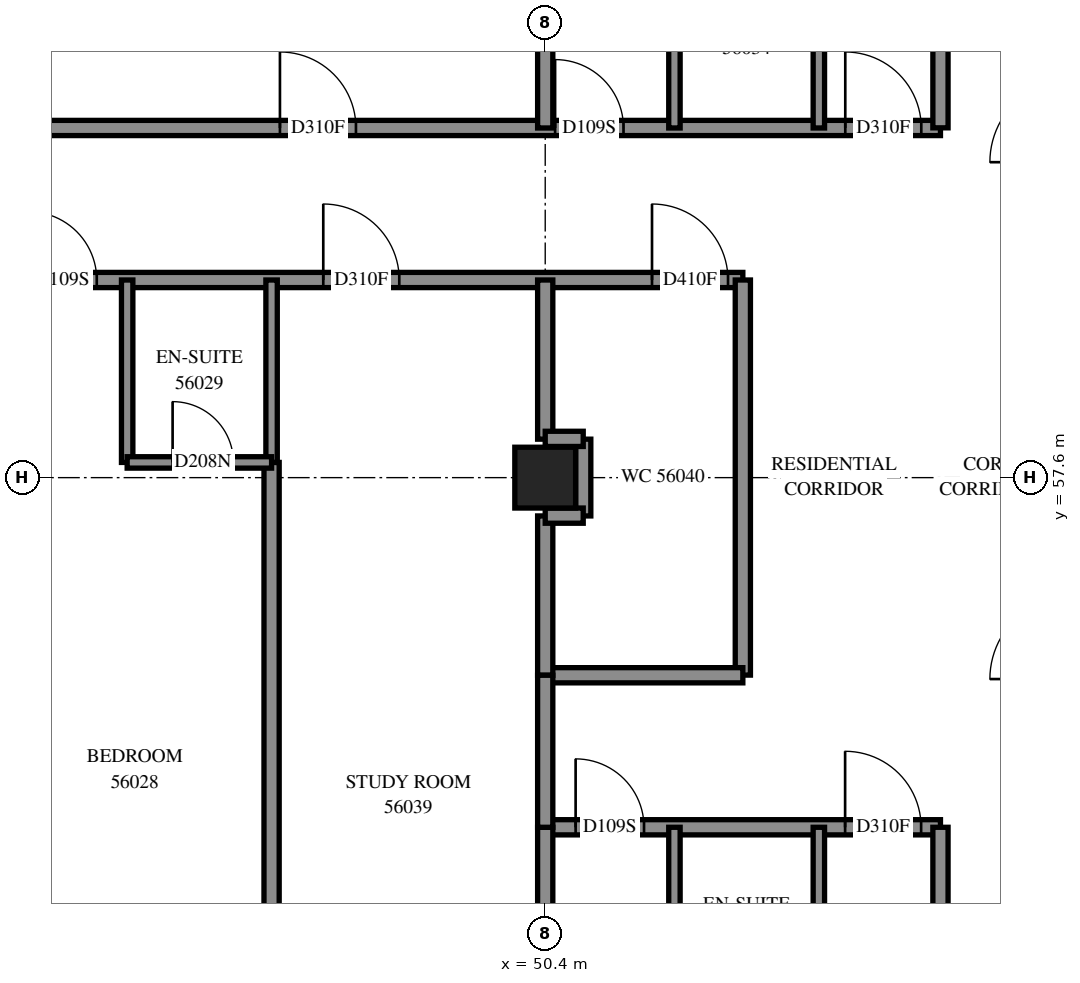
"""IFC4 building model, lengths in metres.
Left out: names, types, materials, properties, quantities, classifications, styles, units other than length and angle.
Written with IfcOpenShell. Run it as: python <this file> out.ifc"""

import sys

from ifc_helpers import new_model, si_unit, direction, frame, frame_2d, origin, origin_2d, place, context, subcontext, project, spatial, rectangle, extrude, element, fill, save


model = new_model("IFC4")
c1 = context("Model", 3, precision=1e-05, world=origin(), true_north=direction((0.0, 1.0)))
c2 = subcontext(c1, "Body", "Model", "MODEL_VIEW")
j1 = project(units=[si_unit("LENGTHUNIT", "METRE"), si_unit("PLANEANGLEUNIT", "RADIAN")], contexts=[c1])
p1 = place(None, origin())
s1 = spatial("IfcSite", under=j1, at=p1, CompositionType="ELEMENT")
p2 = place(p1, origin())
s2 = spatial("IfcBuilding", under=s1, at=p2, CompositionType="ELEMENT")
p3 = place(p2, frame((0.0, 0.0, 206.6)))
s3 = spatial("IfcBuildingStorey", under=s2, at=p3, CompositionType="ELEMENT", Elevation=206.6)
p4 = place(p3, frame((50.4, 57.6, 0.0), z_axis=(0.0, 0.0, 1.0), x_axis=(1.0, 0.0, 0.0)))
e1 = element("IfcColumn", 1, at=p4, inside=s3, PredefinedType="COLUMN", context=c2, shape_type="SweptSolid", body=[
    extrude(rectangle(XDim=0.8, YDim=0.8, at=origin_2d()), origin(), (0.0, 0.0, 1.0), 3.1),
])
p5 = place(p3, frame((36.0, 60.2, 0.0), z_axis=(0.0, 0.0, 1.0), x_axis=(1.0, 0.0, 0.0)))
e2 = element("IfcWall", 2, at=p5, inside=s3, PredefinedType="PARTITIONING", context=c2, shape_type="SweptSolid", body=[
    extrude(rectangle(XDim=17.0, YDim=0.2, at=frame_2d((8.5, 0.0))), origin(), (0.0, 0.0, 1.0), 3.1),
])
p6 = place(p5, frame((4.125, 0.0, 0.0)))
e3 = element("IfcOpeningElement", 3, at=p6, cuts=e2, PredefinedType="OPENING", context=c2, shape_type="SweptSolid", body=[
    extrude(rectangle(XDim=1.0, YDim=2.1, at=frame_2d((0.5, 1.05))), frame((0.0, 0.11, 0.0), z_axis=(0.0, -1.0, 0.0), x_axis=(1.0, 0.0, 0.0)), (0.0, 0.0, 1.0), 0.22),
])
p7 = place(p5, frame((7.6, 0.0, 0.0)))
e4 = element("IfcOpeningElement", 4, at=p7, cuts=e2, PredefinedType="OPENING", context=c2, shape_type="SweptSolid", body=[
    extrude(rectangle(XDim=0.9, YDim=2.1, at=frame_2d((0.45, 1.05))), frame((0.0, 0.11, 0.0), z_axis=(0.0, -1.0, 0.0), x_axis=(1.0, 0.0, 0.0)), (0.0, 0.0, 1.0), 0.22),
])
p8 = place(p5, frame((11.48, 0.0, 0.0)))
e5 = element("IfcOpeningElement", 5, at=p8, cuts=e2, PredefinedType="OPENING", context=c2, shape_type="SweptSolid", body=[
    extrude(rectangle(XDim=1.0, YDim=2.1, at=frame_2d((0.5, 1.05))), frame((0.0, 0.11, 0.0), z_axis=(0.0, -1.0, 0.0), x_axis=(1.0, 0.0, 0.0)), (0.0, 0.0, 1.0), 0.22),
])
p9 = place(p5, frame((15.805, 0.0, 0.0)))
e6 = element("IfcOpeningElement", 6, at=p9, cuts=e2, PredefinedType="OPENING", context=c2, shape_type="SweptSolid", body=[
    extrude(rectangle(XDim=1.0, YDim=2.1, at=frame_2d((0.5, 1.05))), frame((0.0, 0.11, 0.0), z_axis=(0.0, -1.0, 0.0), x_axis=(1.0, 0.0, 0.0)), (0.0, 0.0, 1.0), 0.22),
])
p10 = place(p3, frame((40.602, 62.2, 0.0), z_axis=(0.0, 0.0, 1.0), x_axis=(1.0, 0.0, 0.0)))
e7 = element("IfcWall", 7, at=p10, inside=s3, PredefinedType="PARTITIONING", context=c2, shape_type="SweptSolid", body=[
    extrude(rectangle(XDim=14.998, YDim=0.2, at=frame_2d((7.499, 0.0))), origin(), (0.0, 0.0, 1.0), 3.1),
])
p11 = place(p10, frame((6.308, 0.0, 0.0)))
e8 = element("IfcOpeningElement", 8, at=p11, cuts=e7, PredefinedType="OPENING", context=c2, shape_type="SweptSolid", body=[
    extrude(rectangle(XDim=1.0, YDim=2.1, at=frame_2d((0.5, 1.05))), frame((0.0, 0.11, 0.0), z_axis=(0.0, -1.0, 0.0), x_axis=(1.0, 0.0, 0.0)), (0.0, 0.0, 1.0), 0.22),
])
p12 = place(p10, frame((9.928, 0.0, 0.0)))
e9 = element("IfcOpeningElement", 9, at=p12, cuts=e7, PredefinedType="OPENING", context=c2, shape_type="SweptSolid", body=[
    extrude(rectangle(XDim=0.9, YDim=2.1, at=frame_2d((0.45, 1.05))), frame((0.0, 0.11, 0.0), z_axis=(0.0, -1.0, 0.0), x_axis=(1.0, 0.0, 0.0)), (0.0, 0.0, 1.0), 0.22),
])
p13 = place(p10, frame((13.746, 0.0, 0.0)))
e10 = element("IfcOpeningElement", 10, at=p13, cuts=e7, PredefinedType="OPENING", context=c2, shape_type="SweptSolid", body=[
    extrude(rectangle(XDim=1.0, YDim=2.1, at=frame_2d((0.5, 1.05))), frame((0.0, 0.11, 0.0), z_axis=(0.0, -1.0, 0.0), x_axis=(1.0, 0.0, 0.0)), (0.0, 0.0, 1.0), 0.22),
])
p14 = place(p3, frame((46.8, 49.7, 0.0), z_axis=(0.0, 0.0, 1.0), x_axis=(0.0, 1.0, 0.0)))
e11 = element("IfcWall", 11, at=p14, inside=s3, PredefinedType="PARTITIONING", context=c2, shape_type="SweptSolid", body=[
    extrude(rectangle(XDim=8.1, YDim=0.2, at=frame_2d((4.05, 0.0))), origin(), (0.0, 0.0, 1.0), 3.1),
])
p15 = place(p3, frame((50.4, 53.0, 0.0), z_axis=(0.0, 0.0, 1.0), x_axis=(1.0, 0.0, 0.0)))
e12 = element("IfcWall", 12, at=p15, inside=s3, PredefinedType="PARTITIONING", context=c2, shape_type="SweptSolid", body=[
    extrude(rectangle(XDim=5.2, YDim=0.2, at=frame_2d((2.6, 0.0))), origin(), (0.0, 0.0, 1.0), 3.1),
])
p16 = place(p15, frame((0.4, 0.0, 0.0)))
e13 = element("IfcOpeningElement", 13, at=p16, cuts=e12, PredefinedType="OPENING", context=c2, shape_type="SweptSolid", body=[
    extrude(rectangle(XDim=0.9, YDim=2.1, at=frame_2d((0.45, 1.05))), frame((0.0, 0.11, 0.0), z_axis=(0.0, -1.0, 0.0), x_axis=(1.0, 0.0, 0.0)), (0.0, 0.0, 1.0), 0.22),
])
p17 = place(p15, frame((3.946, 0.0, 0.0)))
e14 = element("IfcOpeningElement", 14, at=p17, cuts=e12, PredefinedType="OPENING", context=c2, shape_type="SweptSolid", body=[
    extrude(rectangle(XDim=1.0, YDim=2.1, at=frame_2d((0.5, 1.05))), frame((0.0, 0.11, 0.0), z_axis=(0.0, -1.0, 0.0), x_axis=(1.0, 0.0, 0.0)), (0.0, 0.0, 1.0), 0.22),
])
p18 = place(p3, frame((53.0, 55.002, 0.0), z_axis=(0.0, 0.0, 1.0), x_axis=(0.0, 1.0, 0.0)))
e15 = element("IfcWall", 15, at=p18, inside=s3, PredefinedType="PARTITIONING", context=c2, shape_type="SweptSolid", body=[
    extrude(rectangle(XDim=5.198, YDim=0.2, at=frame_2d((2.599, 0.0))), origin(), (0.0, 0.0, 1.0), 3.1),
])
p19 = place(p3, frame((55.6, 48.4, 0.0), z_axis=(0.0, 0.0, 1.0), x_axis=(0.0, 1.0, 0.0)))
e16 = element("IfcWall", 16, at=p19, inside=s3, PredefinedType="PARTITIONING", context=c2, shape_type="SweptSolid", body=[
    extrude(rectangle(XDim=4.6, YDim=0.2, at=frame_2d((2.3, 0.0))), origin(), (0.0, 0.0, 1.0), 3.1),
])
p20 = place(p3, frame((55.6, 62.202, 0.0), z_axis=(0.0, 0.0, 1.0), x_axis=(0.0, 1.0, 0.0)))
e17 = element("IfcWall", 17, at=p20, inside=s3, PredefinedType="PARTITIONING", context=c2, shape_type="SweptSolid", body=[
    extrude(rectangle(XDim=4.598, YDim=0.2, at=frame_2d((2.299, 0.0))), origin(), (0.0, 0.0, 1.0), 3.1),
])
p21 = place(p3, frame((50.4, 55.0, 0.0), z_axis=(0.0, 0.0, 1.0), x_axis=(1.0, 0.0, 0.0)))
e18 = element("IfcWall", 18, at=p21, inside=s3, PredefinedType="PARTITIONING", context=c2, shape_type="SweptSolid", body=[
    extrude(rectangle(XDim=2.6, YDim=0.2, at=frame_2d((1.3, 0.0))), origin(), (0.0, 0.0, 1.0), 3.1),
])
for number, where, z_axis, x_axis in (
    (19, (44.9, 57.8, 0.0), (0.0, 0.0, 1.0), (0.0, 1.0, 0.0)),
    (20, (46.8, 57.8, 0.0), (0.0, 0.0, 1.0), (0.0, 1.0, 0.0)),
    (21, (52.1, 50.6, 0.0), (0.0, 0.0, 1.0), (0.0, 1.0, 0.0)),
    (22, (54.0, 50.6, 0.0), (0.0, 0.0, 1.0), (0.0, 1.0, 0.0)),
    (23, (52.1, 62.2, 0.0), (0.0, 0.0, 1.0), (0.0, 1.0, 0.0)),
    (24, (54.0, 62.2, 0.0), (0.0, 0.0, 1.0), (0.0, 1.0, 0.0)),
):
    element("IfcWall", number, at=place(p3, frame(where, z_axis=z_axis, x_axis=x_axis)), inside=s3, PredefinedType="PARTITIONING", context=c2, shape_type="SweptSolid", body=[
        extrude(rectangle(XDim=2.4, YDim=0.15, at=frame_2d((1.2, 0.0))), origin(), (0.0, 0.0, 1.0), 3.1),
    ])
p22 = place(p3, frame((50.4, 50.8, 0.0), z_axis=(0.0, 0.0, 1.0), x_axis=(0.0, 1.0, 0.0)))
e25 = element("IfcWall", 25, at=p22, inside=s3, PredefinedType="PARTITIONING", context=c2, shape_type="SweptSolid", body=[
    extrude(rectangle(XDim=2.2, YDim=0.2, at=frame_2d((1.1, 0.0))), origin(), (0.0, 0.0, 1.0), 3.1),
])
for number, where, z_axis, x_axis in (
    (26, (50.4, 62.2, 0.0), (0.0, 0.0, 1.0), (0.0, 1.0, 0.0)),
    (27, (50.4, 55.0, 0.0), (0.0, 0.0, 1.0), (0.0, 1.0, 0.0)),
):
    element("IfcWall", number, at=place(p3, frame(where, z_axis=z_axis, x_axis=x_axis)), inside=s3, PredefinedType="PARTITIONING", context=c2, shape_type="SweptSolid", body=[
        extrude(rectangle(XDim=2.096, YDim=0.2, at=frame_2d((1.048, 0.0))), origin(), (0.0, 0.0, 1.0), 3.1),
    ])
p23 = place(p3, frame((50.4, 58.106, 0.0), z_axis=(0.0, 0.0, 1.0), x_axis=(0.0, 1.0, 0.0)))
e28 = element("IfcWall", 28, at=p23, inside=s3, PredefinedType="PARTITIONING", context=c2, shape_type="SweptSolid", body=[
    extrude(rectangle(XDim=2.094, YDim=0.2, at=frame_2d((1.047, 0.0))), origin(), (0.0, 0.0, 1.0), 3.1),
])
p24 = place(p3, frame((50.4, 53.0, 0.0), z_axis=(0.0, 0.0, 1.0), x_axis=(0.0, 1.0, 0.0)))
e29 = element("IfcWall", 29, at=p24, inside=s3, PredefinedType="PARTITIONING", context=c2, shape_type="SweptSolid", body=[
    extrude(rectangle(XDim=2.0, YDim=0.2, at=frame_2d((1.0, 0.0))), origin(), (0.0, 0.0, 1.0), 3.1),
])
p25 = place(p3, frame((44.9, 57.8, 0.0), z_axis=(0.0, 0.0, 1.0), x_axis=(1.0, 0.0, 0.0)))
e30 = element("IfcWall", 30, at=p25, inside=s3, PredefinedType="PARTITIONING", context=c2, shape_type="SweptSolid", body=[
    extrude(rectangle(XDim=1.9, YDim=0.15, at=frame_2d((0.95, 0.0))), origin(), (0.0, 0.0, 1.0), 3.1),
])
p26 = place(p25, frame((0.598, 0.0, 0.0)))
e31 = element("IfcOpeningElement", 31, at=p26, cuts=e30, PredefinedType="OPENING", context=c2, shape_type="SweptSolid", body=[
    extrude(rectangle(XDim=0.8, YDim=2.1, at=frame_2d((0.4, 1.05))), frame((0.0, 0.085, 0.0), z_axis=(0.0, -1.0, 0.0), x_axis=(1.0, 0.0, 0.0)), (0.0, 0.0, 1.0), 0.17),
])
p27 = place(p3, frame((50.9, 57.096, 0.0), z_axis=(0.0, 0.0, 1.0), x_axis=(0.0, 1.0, 0.0)))
e32 = element("IfcWall", 32, at=p27, inside=s3, PredefinedType="PARTITIONING", context=c2, shape_type="SweptSolid", body=[
    extrude(rectangle(XDim=1.01, YDim=0.2, at=frame_2d((0.505, 0.0))), origin(), (0.0, 0.0, 1.0), 3.1),
])
for number, where, z_axis, x_axis in (
    (33, (50.4, 58.11, 0.0), (0.0, 0.0, 1.0), (1.0, 0.0, 0.0)),
    (34, (50.4, 57.1, 0.0), (0.0, 0.0, 1.0), (1.0, 0.0, 0.0)),
):
    element("IfcWall", number, at=place(p3, frame(where, z_axis=z_axis, x_axis=x_axis)), inside=s3, PredefinedType="PARTITIONING", context=c2, shape_type="SweptSolid", body=[
        extrude(rectangle(XDim=0.5, YDim=0.2, at=frame_2d((0.25, 0.0))), origin(), (0.0, 0.0, 1.0), 3.1),
    ])
p28 = place(p7, origin())
e35 = element("IfcDoor", 35, at=p28, inside=s3, OperationType="SINGLE_SWING_LEFT", PredefinedType="DOOR", context=c2, shape_type="SweptSolid", body=[
    extrude(rectangle(XDim=0.9, YDim=2.1, at=frame_2d((0.45, 1.05))), frame((0.0, 0.025, 0.0), z_axis=(0.0, -1.0, 0.0), x_axis=(1.0, 0.0, 0.0)), (0.0, 0.0, 1.0), 0.05),
])
fill(e4, e35)
p29 = place(p26, origin())
e36 = element("IfcDoor", 36, at=p29, inside=s3, OperationType="SINGLE_SWING_RIGHT", PredefinedType="DOOR", context=c2, shape_type="SweptSolid", body=[
    extrude(rectangle(XDim=0.8, YDim=2.1, at=frame_2d((0.4, 1.05))), frame((0.0, 0.025, 0.0), z_axis=(0.0, -1.0, 0.0), x_axis=(1.0, 0.0, 0.0)), (0.0, 0.0, 1.0), 0.05),
])
fill(e31, e36)
p30 = place(p11, origin())
e37 = element("IfcDoor", 37, at=p30, inside=s3, OperationType="SINGLE_SWING_RIGHT", PredefinedType="DOOR", context=c2, shape_type="SweptSolid", body=[
    extrude(rectangle(XDim=1.0, YDim=2.1, at=frame_2d((0.5, 1.05))), frame((0.0, 0.025, 0.0), z_axis=(0.0, -1.0, 0.0), x_axis=(1.0, 0.0, 0.0)), (0.0, 0.0, 1.0), 0.05),
])
fill(e8, e37)
p31 = place(p12, origin())
e38 = element("IfcDoor", 38, at=p31, inside=s3, OperationType="SINGLE_SWING_RIGHT", PredefinedType="DOOR", context=c2, shape_type="SweptSolid", body=[
    extrude(rectangle(XDim=0.9, YDim=2.1, at=frame_2d((0.45, 1.05))), frame((0.0, 0.025, 0.0), z_axis=(0.0, -1.0, 0.0), x_axis=(1.0, 0.0, 0.0)), (0.0, 0.0, 1.0), 0.05),
])
fill(e9, e38)
p32 = place(p13, origin())
e39 = element("IfcDoor", 39, at=p32, inside=s3, OperationType="SINGLE_SWING_LEFT", PredefinedType="DOOR", context=c2, shape_type="SweptSolid", body=[
    extrude(rectangle(XDim=1.0, YDim=2.1, at=frame_2d((0.5, 1.05))), frame((0.0, 0.025, 0.0), z_axis=(0.0, -1.0, 0.0), x_axis=(1.0, 0.0, 0.0)), (0.0, 0.0, 1.0), 0.05),
])
fill(e10, e39)
p33 = place(p8, origin())
e40 = element("IfcDoor", 40, at=p33, inside=s3, OperationType="SINGLE_SWING_RIGHT", PredefinedType="DOOR", context=c2, shape_type="SweptSolid", body=[
    extrude(rectangle(XDim=1.0, YDim=2.1, at=frame_2d((0.5, 1.05))), frame((0.0, 0.025, 0.0), z_axis=(0.0, -1.0, 0.0), x_axis=(1.0, 0.0, 0.0)), (0.0, 0.0, 1.0), 0.05),
])
fill(e5, e40)
p34 = place(p9, origin())
e41 = element("IfcDoor", 41, at=p34, inside=s3, OperationType="SINGLE_SWING_LEFT", PredefinedType="DOOR", context=c2, shape_type="SweptSolid", body=[
    extrude(rectangle(XDim=1.0, YDim=2.1, at=frame_2d((0.5, 1.05))), frame((0.0, 0.025, 0.0), z_axis=(0.0, -1.0, 0.0), x_axis=(1.0, 0.0, 0.0)), (0.0, 0.0, 1.0), 0.05),
])
fill(e6, e41)
p35 = place(p16, origin())
e42 = element("IfcDoor", 42, at=p35, inside=s3, OperationType="SINGLE_SWING_LEFT", PredefinedType="DOOR", context=c2, shape_type="SweptSolid", body=[
    extrude(rectangle(XDim=0.9, YDim=2.1, at=frame_2d((0.45, 1.05))), frame((0.0, 0.025, 0.0), z_axis=(0.0, -1.0, 0.0), x_axis=(1.0, 0.0, 0.0)), (0.0, 0.0, 1.0), 0.05),
])
fill(e13, e42)
p36 = place(p17, origin())
e43 = element("IfcDoor", 43, at=p36, inside=s3, OperationType="SINGLE_SWING_RIGHT", PredefinedType="DOOR", context=c2, shape_type="SweptSolid", body=[
    extrude(rectangle(XDim=1.0, YDim=2.1, at=frame_2d((0.5, 1.05))), frame((0.0, 0.025, 0.0), z_axis=(0.0, -1.0, 0.0), x_axis=(1.0, 0.0, 0.0)), (0.0, 0.0, 1.0), 0.05),
])
fill(e14, e43)
save(model, sys.argv[1])
